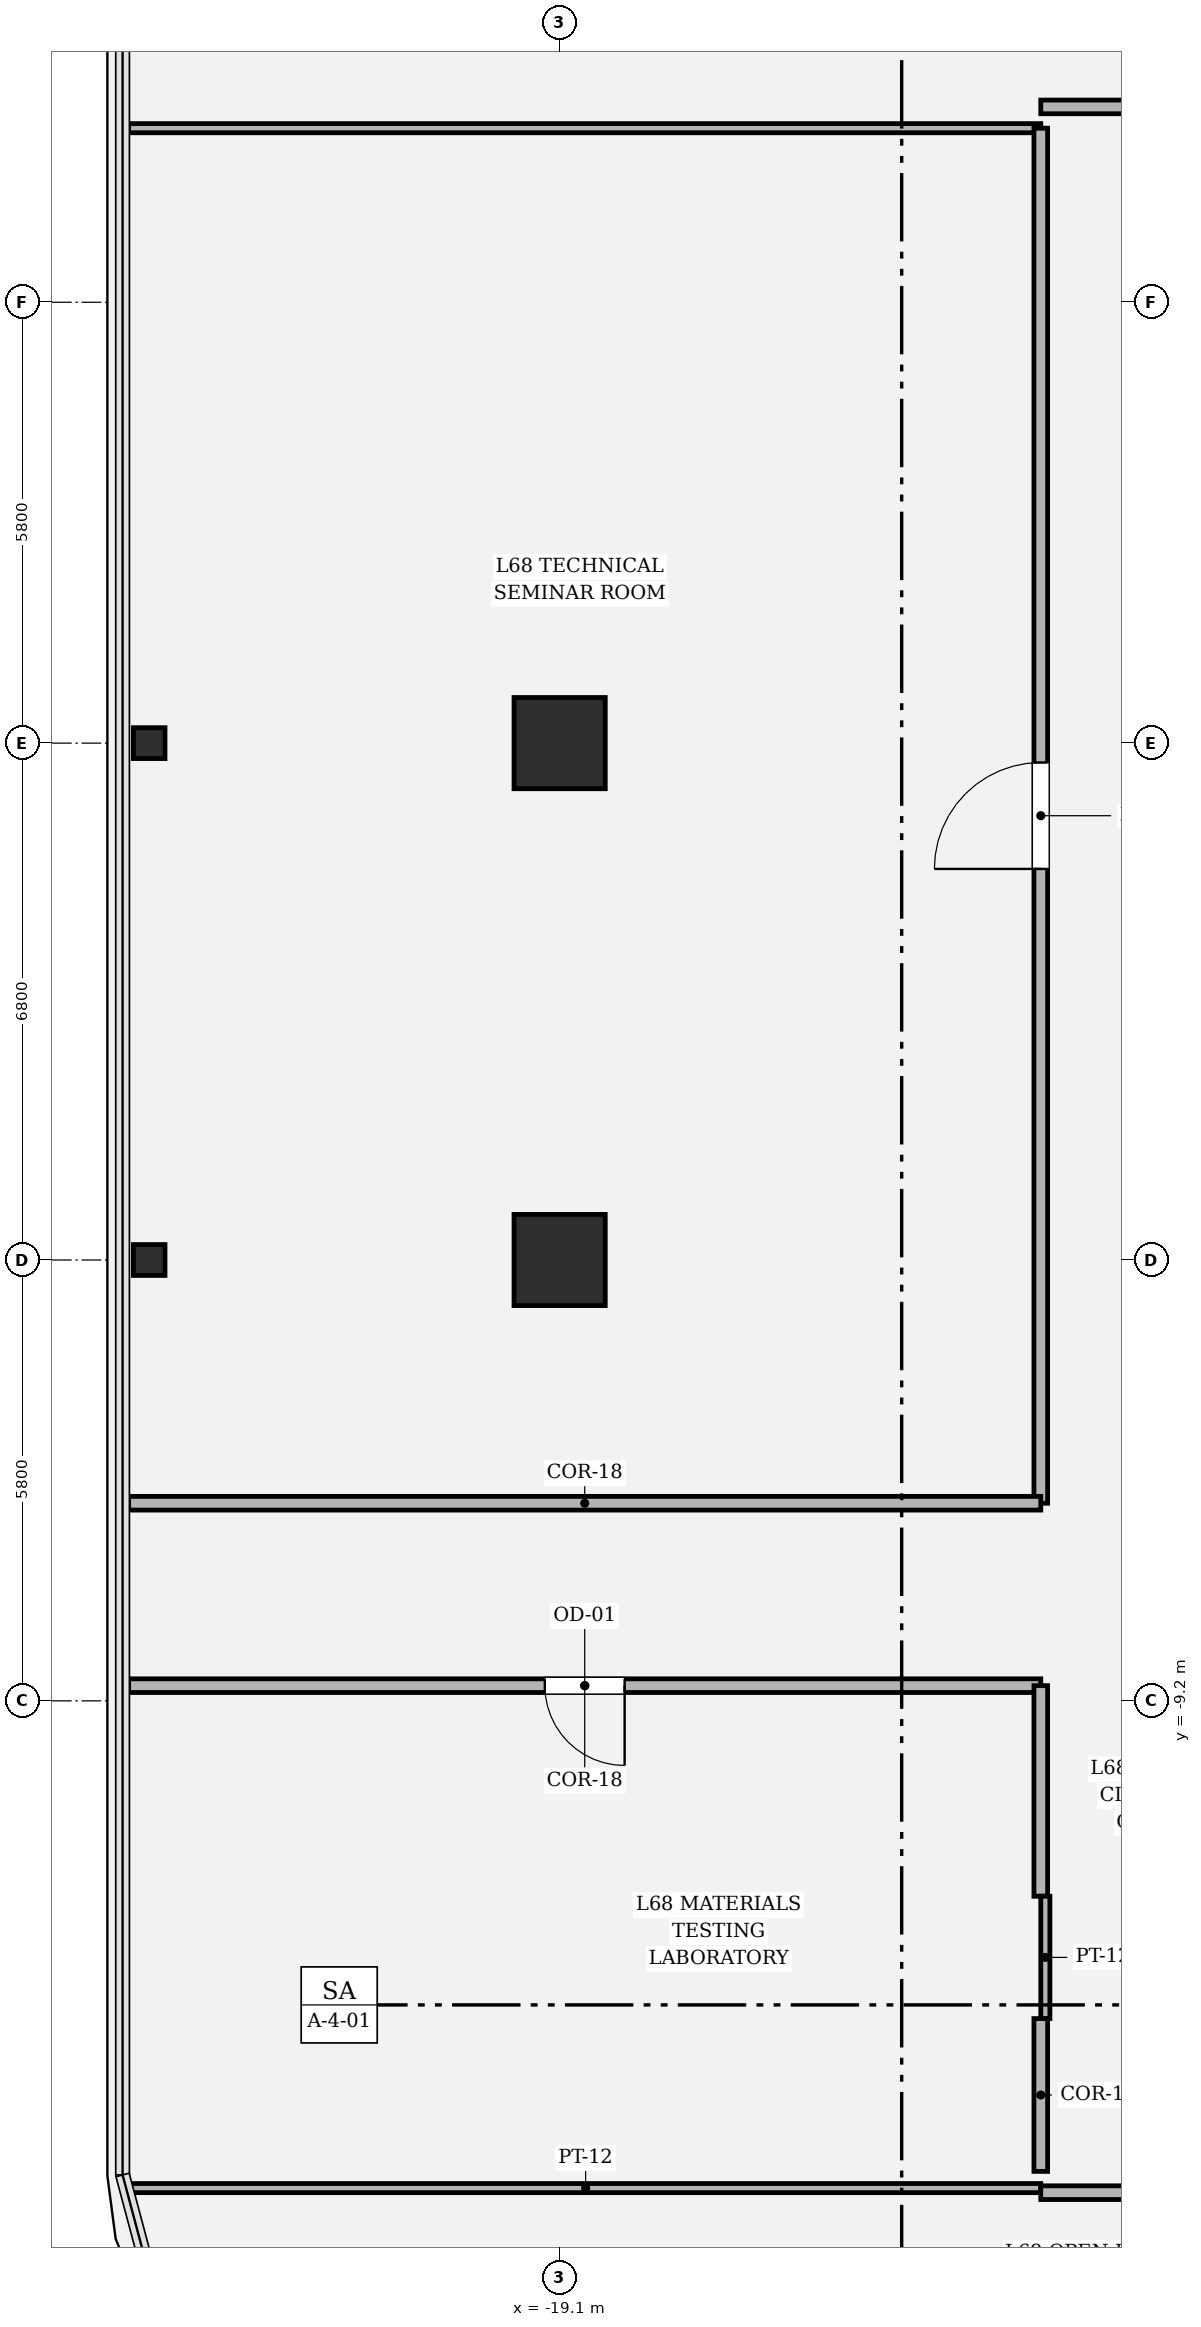
"""IFC4 building model, lengths in metres.
Left out: names, types, materials, properties, quantities, classifications, styles, units other than length and angle.
Written with IfcOpenShell. Run it as: python <this file> out.ifc"""

import sys

from ifc_helpers import new_model, si_unit, direction, frame, frame_2d, origin, origin_2d, place, context, subcontext, project, spatial, rectangle, hollow_rectangle, i_section, extrude, element, fill, save


model = new_model("IFC4")
c1 = context("Model", 3, precision=1e-05, world=origin(), true_north=direction((0.0, 1.0)))
c2 = subcontext(c1, "Body", "Model", "MODEL_VIEW")
j1 = project(units=[si_unit("LENGTHUNIT", "METRE"), si_unit("PLANEANGLEUNIT", "RADIAN")], contexts=[c1])
p1 = place(None, origin())
s1 = spatial("IfcSite", under=j1, at=p1, CompositionType="ELEMENT")
p2 = place(p1, origin())
s2 = spatial("IfcBuilding", under=s1, at=p2, CompositionType="ELEMENT")
p3 = place(p2, frame((0.0, 0.0, 288.0)))
s3 = spatial("IfcBuildingStorey", under=s2, at=p3, CompositionType="ELEMENT", Elevation=288.0)
for number, where, z_axis, x_axis in (
    (1, (-19.1, 3.4, 0.0), (0.0, 0.0, 1.0), (1.0, 0.0, 0.0)),
    (2, (-19.1, -3.4, 0.0), (0.0, 0.0, 1.0), (1.0, 0.0, 0.0)),
):
    element("IfcColumn", number, at=place(p3, frame(where, z_axis=z_axis, x_axis=x_axis)), inside=s3, PredefinedType="COLUMN", context=c2, shape_type="SweptSolid", body=[
        extrude(hollow_rectangle(XDim=1.2, YDim=1.2, WallThickness=0.035, at=origin_2d()), origin(), (0.0, 0.0, 1.0), 4.2),
    ])
for number, where, z_axis, x_axis in (
    (3, (-24.5, -3.4, 0.0), (0.0, 0.0, 1.0), (0.0, 1.0, 0.0)),
    (4, (-24.5, 3.4, 0.0), (0.0, 0.0, 1.0), (0.0, 1.0, 0.0)),
):
    element("IfcColumn", number, at=place(p3, frame(where, z_axis=z_axis, x_axis=x_axis)), inside=s3, PredefinedType="COLUMN", context=c2, shape_type="SweptSolid", body=[
        extrude(i_section(OverallWidth=0.406, OverallDepth=0.416, WebThickness=0.029, FlangeThickness=0.048, FilletRadius=0.018, at=origin_2d()), origin(), (0.0, 0.0, 1.0), 4.198),
    ])
p4 = place(p3, frame((-24.747, -15.61, 0.0), z_axis=(0.0, 0.0, 1.0), x_axis=(1.0, 0.0, 0.0)))
e5 = element("IfcWall", 5, at=p4, inside=s3, PredefinedType="PARTITIONING", context=c2, shape_type="SweptSolid", body=[
    extrude(rectangle(XDim=11.977, YDim=0.12, at=frame_2d((5.988, 0.0))), origin(), (0.0, 0.0, 1.0), 2.714),
])
p5 = place(p3, frame((-12.77, -15.67, 0.0), z_axis=(0.0, 0.0, 1.0), x_axis=(1.0, 0.0, 0.0)))
e6 = element("IfcWall", 6, at=p5, inside=s3, PredefinedType="PARTITIONING", context=c2, shape_type="SweptSolid", body=[
    extrude(rectangle(XDim=13.088, YDim=0.18, at=frame_2d((6.544, 0.0))), origin(), (0.0, 0.0, 1.0), 3.394),
])
p6 = place(p5, frame((6.019, 0.0, 0.0)))
e7 = element("IfcOpeningElement", 7, at=p6, cuts=e6, PredefinedType="OPENING", context=c2, shape_type="SweptSolid", body=[
    extrude(rectangle(XDim=1.05, YDim=2.2, at=frame_2d((0.525, 1.1))), frame((0.0, 0.1, 0.0), z_axis=(0.0, -1.0, 0.0), x_axis=(1.0, 0.0, 0.0)), (0.0, 0.0, 1.0), 0.2),
])
p7 = place(p3, frame((-24.77, -9.0, 0.0), z_axis=(0.0, 0.0, 1.0), x_axis=(1.0, 0.0, 0.0)))
e8 = element("IfcWall", 8, at=p7, inside=s3, PredefinedType="PARTITIONING", context=c2, shape_type="SweptSolid", body=[
    extrude(rectangle(XDim=12.0, YDim=0.18, at=frame_2d((6.0, 0.0))), origin(), (0.0, 0.0, 1.0), 2.714),
])
p8 = place(p7, frame((5.475, 0.0, 0.0)))
e9 = element("IfcOpeningElement", 9, at=p8, cuts=e8, PredefinedType="OPENING", context=c2, shape_type="SweptSolid", body=[
    extrude(rectangle(XDim=1.05, YDim=2.2, at=frame_2d((0.525, 1.1))), frame((0.0, 0.1, 0.0), z_axis=(0.0, -1.0, 0.0), x_axis=(1.0, 0.0, 0.0)), (0.0, 0.0, 1.0), 0.2),
])
p9 = place(p3, frame((-12.77, -9.0, 0.0), z_axis=(0.0, 0.0, 1.0), x_axis=(0.0, -1.0, 0.0)))
e10 = element("IfcWall", 10, at=p9, inside=s3, PredefinedType="PARTITIONING", context=c2, shape_type="SweptSolid", body=[
    extrude(rectangle(XDim=2.77, YDim=0.18, at=frame_2d((1.385, 0.0))), origin(), (0.0, 0.0, 1.0), 3.394),
])
p10 = place(p3, frame((-12.71, -11.77, 0.0), z_axis=(0.0, 0.0, 1.0), x_axis=(0.0, -1.0, 0.0)))
e11 = element("IfcWall", 11, at=p10, inside=s3, PredefinedType="PARTITIONING", context=c2, shape_type="SweptSolid", body=[
    extrude(rectangle(XDim=1.61, YDim=0.12, at=frame_2d((0.805, 0.0))), origin(), (0.0, 0.0, 1.0), 3.634),
])
p11 = place(p3, frame((-12.77, -13.38, 0.0), z_axis=(0.0, 0.0, 1.0), x_axis=(0.0, -1.0, 0.0)))
e12 = element("IfcWall", 12, at=p11, inside=s3, PredefinedType="PARTITIONING", context=c2, shape_type="SweptSolid", body=[
    extrude(rectangle(XDim=2.01, YDim=0.18, at=frame_2d((1.005, 0.0))), origin(), (0.0, 0.0, 1.0), 3.634),
])
p12 = place(p3, frame((-24.77, 11.49, 0.0), z_axis=(0.0, 0.0, 1.0), x_axis=(1.0, 0.0, 0.0)))
e13 = element("IfcWall", 13, at=p12, inside=s3, PredefinedType="PARTITIONING", context=c2, shape_type="SweptSolid", body=[
    extrude(rectangle(XDim=12.0, YDim=0.12, at=frame_2d((6.0, 0.0))), origin(), (0.0, 0.0, 1.0), 2.714),
])
p13 = place(p3, frame((-12.77, 11.49, 0.0), z_axis=(0.0, 0.0, 1.0), x_axis=(0.0, -1.0, 0.0)))
e14 = element("IfcWall", 14, at=p13, inside=s3, PredefinedType="PARTITIONING", context=c2, shape_type="SweptSolid", body=[
    extrude(rectangle(XDim=18.09, YDim=0.18, at=frame_2d((9.045, 0.0))), origin(), (0.0, 0.0, 1.0), 3.394),
])
p14 = place(p13, frame((8.345, 0.0, 0.0)))
e15 = element("IfcOpeningElement", 15, at=p14, cuts=e14, PredefinedType="OPENING", context=c2, shape_type="SweptSolid", body=[
    extrude(rectangle(XDim=1.4, YDim=2.25, at=frame_2d((0.7, 1.125))), frame((0.0, 0.1, 0.0), z_axis=(0.0, -1.0, 0.0), x_axis=(1.0, 0.0, 0.0)), (0.0, 0.0, 1.0), 0.2),
])
p15 = place(p3, frame((-12.77, -6.6, 0.0), z_axis=(0.0, 0.0, 1.0), x_axis=(-1.0, 0.0, 0.0)))
e16 = element("IfcWall", 16, at=p15, inside=s3, PredefinedType="PARTITIONING", context=c2, shape_type="SweptSolid", body=[
    extrude(rectangle(XDim=12.0, YDim=0.18, at=frame_2d((6.0, 0.0))), origin(), (0.0, 0.0, 1.0), 2.714),
])
p16 = place(p3, frame((-6.627, 11.77, 0.0), z_axis=(0.0, 0.0, 1.0), x_axis=(-1.0, 0.0, 0.0)))
e17 = element("IfcWall", 17, at=p16, inside=s3, PredefinedType="PARTITIONING", context=c2, shape_type="SweptSolid", body=[
    extrude(rectangle(XDim=6.143, YDim=0.18, at=frame_2d((3.072, 0.0))), origin(), (0.0, 0.0, 1.0), 3.394),
])
p17 = place(p16, frame((2.546, 0.0, 0.0)))
e18 = element("IfcOpeningElement", 18, at=p17, cuts=e17, PredefinedType="OPENING", context=c2, shape_type="SweptSolid", body=[
    extrude(rectangle(XDim=1.05, YDim=2.2, at=frame_2d((0.525, 1.1))), frame((0.0, 0.1, 0.0), z_axis=(0.0, -1.0, 0.0), x_axis=(1.0, 0.0, 0.0)), (0.0, 0.0, 1.0), 0.2),
])
p18 = place(p8, origin())
e19 = element("IfcDoor", 19, at=p18, inside=s3, OperationType="SINGLE_SWING_RIGHT", PredefinedType="DOOR", context=c2, shape_type="SweptSolid", body=[
    extrude(rectangle(XDim=1.05, YDim=2.2, at=frame_2d((0.525, 1.1))), frame((0.0, 0.025, 0.0), z_axis=(0.0, -1.0, 0.0), x_axis=(1.0, 0.0, 0.0)), (0.0, 0.0, 1.0), 0.05),
])
fill(e9, e19)
p19 = place(p14, origin())
e20 = element("IfcDoor", 20, at=p19, inside=s3, OperationType="SINGLE_SWING_RIGHT", PredefinedType="DOOR", context=c2, shape_type="SweptSolid", body=[
    extrude(rectangle(XDim=1.4, YDim=2.25, at=frame_2d((0.7, 1.125))), frame((0.0, 0.025, 0.0), z_axis=(0.0, -1.0, 0.0), x_axis=(1.0, 0.0, 0.0)), (0.0, 0.0, 1.0), 0.05),
])
fill(e15, e20)
save(model, sys.argv[1])
